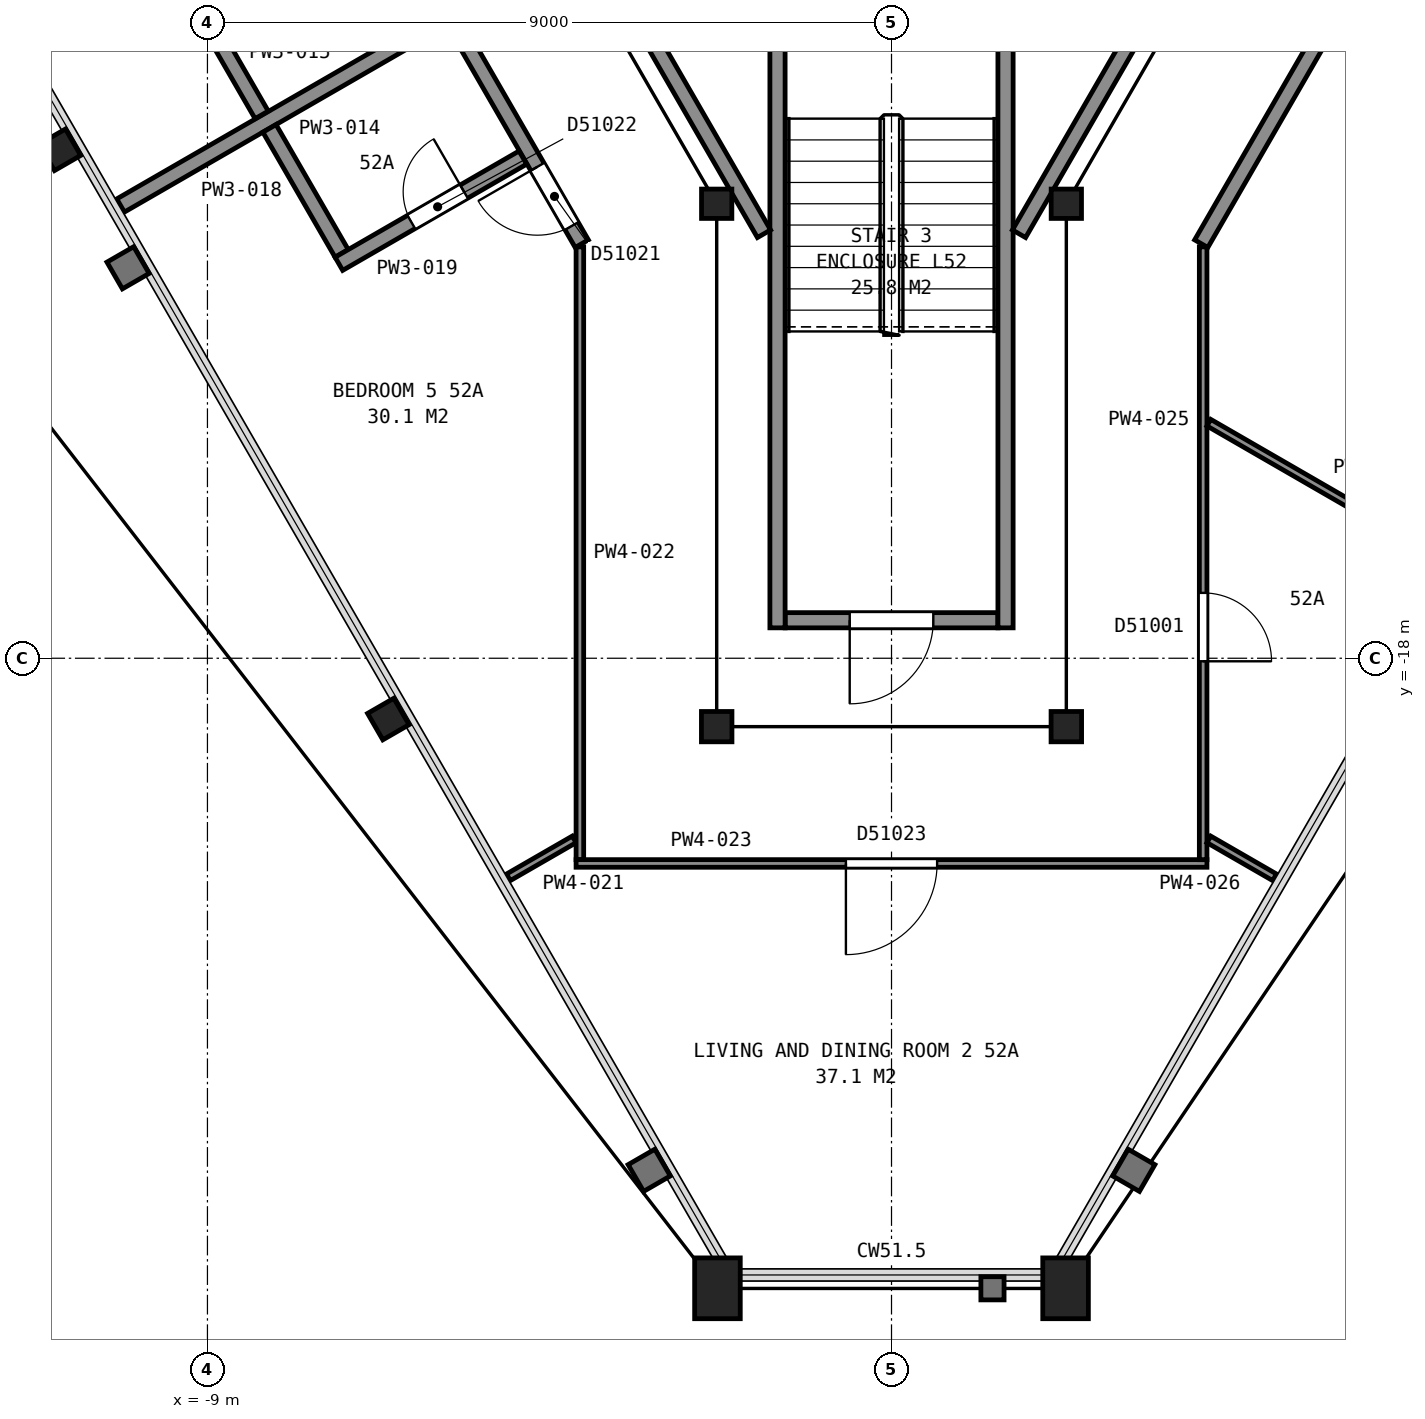
"""IFC4 building model, lengths in metres.
Left out: names, types, materials, properties, quantities, classifications, styles, units other than length and angle.
Written with IfcOpenShell. Run it as: python <this file> out.ifc"""

import sys

from ifc_helpers import new_model, si_unit, direction, frame, frame_2d, origin, origin_2d, place, context, subcontext, project, spatial, rectangle, hollow_rectangle, i_section, extrude, element, fill, save


model = new_model("IFC4")
c1 = context("Model", 3, precision=1e-05, world=origin(), true_north=direction((0.0, 1.0)))
c2 = subcontext(c1, "Body", "Model", "MODEL_VIEW")
j1 = project(units=[si_unit("LENGTHUNIT", "METRE"), si_unit("PLANEANGLEUNIT", "RADIAN")], contexts=[c1])
p1 = place(None, origin())
s1 = spatial("IfcSite", under=j1, at=p1, CompositionType="ELEMENT")
p2 = place(p1, origin())
s2 = spatial("IfcBuilding", under=s1, at=p2, CompositionType="ELEMENT")
p3 = place(p2, frame((0.0, 0.0, 210.1)))
s3 = spatial("IfcBuildingStorey", under=s2, at=p3, CompositionType="ELEMENT", Elevation=210.1)
for number, where, z_axis, x_axis in (
    (1, (-10.94, -11.31, 0.0), (0.0, 0.0, 1.0), (-0.5, 0.866, 0.0)),
    (2, (-6.62, -18.8, 0.0), (0.0, 0.0, 1.0), (-0.5, 0.866, 0.0)),
):
    element("IfcColumn", number, at=place(p3, frame(where, z_axis=z_axis, x_axis=x_axis)), inside=s3, PredefinedType="COLUMN", context=c2, shape_type="SweptSolid", body=[
        extrude(i_section(OverallWidth=0.401, OverallDepth=0.399, WebThickness=0.025, FlangeThickness=0.04, FilletRadius=0.015, at=origin_2d()), origin(), (0.0, 0.0, 1.0), 3.665),
    ])
for number, where, z_axis, x_axis in (
    (3, (-2.29, -26.29, 0.0), (0.0, 0.0, 1.0), (-1.0, 0.0, 0.0)),
    (4, (2.29, -26.29, 0.0), (0.0, 0.0, 1.0), (-1.0, 0.0, 0.0)),
):
    element("IfcColumn", number, at=place(p3, frame(where, z_axis=z_axis, x_axis=x_axis)), inside=s3, PredefinedType="COLUMN", context=c2, shape_type="SweptSolid", body=[
        extrude(hollow_rectangle(XDim=0.6, YDim=0.8, WallThickness=0.05, at=origin_2d()), origin(), (0.0, 0.0, 1.0), 3.635),
    ])
p4 = place(p3, frame((-2.3, -12.02, 0.0), z_axis=(0.0, 0.0, 1.0), x_axis=(1.0, 0.0, 0.0)))
e5 = element("IfcColumn", 5, at=p4, inside=s3, PredefinedType="COLUMN", context=c2, shape_type="SweptSolid", body=[
    extrude(i_section(OverallWidth=0.399, OverallDepth=0.386, WebThickness=0.021, FlangeThickness=0.033, FilletRadius=0.015, at=origin_2d()), origin(), (0.0, 0.0, 1.0), 3.7),
])
for number, where, z_axis, x_axis in (
    (6, (-2.3, -18.9, 0.0), (0.0, 0.0, 1.0), (-1.0, 0.0, 0.0)),
    (7, (2.3, -18.9, 0.0), (0.0, 0.0, 1.0), (-1.0, 0.0, 0.0)),
):
    element("IfcColumn", number, at=place(p3, frame(where, z_axis=z_axis, x_axis=x_axis)), inside=s3, PredefinedType="COLUMN", context=c2, shape_type="SweptSolid", body=[
        extrude(i_section(OverallWidth=0.401, OverallDepth=0.399, WebThickness=0.025, FlangeThickness=0.04, FilletRadius=0.015, at=origin_2d()), origin(), (0.0, 0.0, 1.0), 3.7),
    ])
p5 = place(p3, frame((2.3, -12.02, 0.0), z_axis=(0.0, 0.0, 1.0), x_axis=(1.0, 0.0, 0.0)))
e8 = element("IfcColumn", 8, at=p5, inside=s3, PredefinedType="COLUMN", context=c2, shape_type="SweptSolid", body=[
    extrude(i_section(OverallWidth=0.399, OverallDepth=0.386, WebThickness=0.021, FlangeThickness=0.033, FilletRadius=0.015, at=origin_2d()), origin(), (0.0, 0.0, 1.0), 3.7),
])
p6 = place(p3, frame((-1.4, -17.5, 0.0), z_axis=(0.0, 0.0, 1.0), x_axis=(1.0, 0.0, 0.0)))
e9 = element("IfcWall", 9, at=p6, inside=s3, PredefinedType="PARTITIONING", context=c2, shape_type="SweptSolid", body=[
    extrude(rectangle(XDim=2.8, YDim=0.2, at=frame_2d((1.4, 0.0))), origin(), (0.0, 0.0, 1.0), 3.45),
])
p7 = place(p6, frame((0.85, 0.0, 0.0)))
e10 = element("IfcOpeningElement", 10, at=p7, cuts=e9, PredefinedType="OPENING", context=c2, shape_type="SweptSolid", body=[
    extrude(rectangle(XDim=1.1, YDim=2.1, at=frame_2d((0.55, 1.05))), frame((0.0, 0.11, 0.0), z_axis=(0.0, -1.0, 0.0), x_axis=(1.0, 0.0, 0.0)), (0.0, 0.0, 1.0), 0.22),
])
for number, where, z_axis, x_axis in (
    (11, (1.5, -8.0, 0.0), (0.0, 0.0, 1.0), (0.0, -1.0, 0.0)),
    (12, (-1.5, -8.0, 0.0), (0.0, 0.0, 1.0), (0.0, -1.0, 0.0)),
):
    element("IfcWall", number, at=place(p3, frame(where, z_axis=z_axis, x_axis=x_axis)), inside=s3, PredefinedType="PARTITIONING", context=c2, shape_type="SweptSolid", body=[
        extrude(rectangle(XDim=9.6, YDim=0.2, at=frame_2d((4.8, 0.0))), origin(), (0.0, 0.0, 1.0), 3.45),
    ])
p8 = place(p3, frame((-4.655, -7.257, 0.0), z_axis=(0.0, 0.0, 1.0), x_axis=(0.499966124405, -0.866044960985, 0.0)))
e13 = element("IfcWall", 13, at=p8, inside=s3, PredefinedType="PARTITIONING", context=c2, shape_type="SweptSolid", body=[
    extrude(rectangle(XDim=5.956, YDim=0.2, at=frame_2d((2.978, 0.0))), origin(), (0.0, 0.0, 1.0), 3.45),
])
p9 = place(p8, frame((0.45, 0.0, 0.0)))
e14 = element("IfcOpeningElement", 14, at=p9, cuts=e13, PredefinedType="OPENING", context=c2, shape_type="SweptSolid", body=[
    extrude(rectangle(XDim=1.8, YDim=2.1, at=frame_2d((0.9, 1.05))), frame((0.0, 0.11, 0.0), z_axis=(0.0, -1.0, 0.0), x_axis=(1.0, 0.0, 0.0)), (0.0, 0.0, 1.0), 0.22),
])
p10 = place(p3, frame((1.677, -12.415, 0.0), z_axis=(0.0, 0.0, 1.0), x_axis=(0.500054337157, 0.865994029939, 0.0)))
e15 = element("IfcWall", 15, at=p10, inside=s3, PredefinedType="PARTITIONING", context=c2, shape_type="SweptSolid", body=[
    extrude(rectangle(XDim=6.177, YDim=0.2, at=frame_2d((3.088, 0.0))), origin(), (0.0, 0.0, 1.0), 3.45),
])
p11 = place(p3, frame((-4.075, -12.545, 0.0), z_axis=(0.0, 0.0, 1.0), x_axis=(-0.499999743747, 0.866025551732, 0.0)))
e16 = element("IfcWall", 16, at=p11, inside=s3, PredefinedType="PARTITIONING", context=c2, shape_type="SweptSolid", body=[
    extrude(rectangle(XDim=17.656, YDim=0.2, at=frame_2d((8.828, 0.0))), origin(), (0.0, 0.0, 1.0), 2.713),
])
p12 = place(p11, frame((9.895, 0.0, 0.0)))
e17 = element("IfcOpeningElement", 17, at=p12, cuts=e16, PredefinedType="OPENING", context=c2, shape_type="SweptSolid", body=[
    extrude(rectangle(XDim=0.9, YDim=2.1, at=frame_2d((0.45, 1.05))), frame((0.0, 0.11, 0.0), z_axis=(0.0, -1.0, 0.0), x_axis=(1.0, 0.0, 0.0)), (0.0, 0.0, 1.0), 0.22),
])
p13 = place(p11, frame((6.622, 0.0, 0.0)))
e18 = element("IfcOpeningElement", 18, at=p13, cuts=e16, PredefinedType="OPENING", context=c2, shape_type="SweptSolid", body=[
    extrude(rectangle(XDim=0.9, YDim=2.1, at=frame_2d((0.45, 1.05))), frame((0.0, 0.11, 0.0), z_axis=(0.0, -1.0, 0.0), x_axis=(1.0, 0.0, 0.0)), (0.0, 0.0, 1.0), 0.22),
])
p14 = place(p11, frame((0.268, 0.0, 0.0)))
e19 = element("IfcOpeningElement", 19, at=p14, cuts=e16, PredefinedType="OPENING", context=c2, shape_type="SweptSolid", body=[
    extrude(rectangle(XDim=0.9, YDim=2.1, at=frame_2d((0.45, 1.05))), frame((0.0, 0.11, 0.0), z_axis=(0.0, -1.0, 0.0), x_axis=(1.0, 0.0, 0.0)), (0.0, 0.0, 1.0), 0.22),
])
p15 = place(p3, frame((-10.143, -12.043, 0.0), z_axis=(0.0, 0.0, 1.0), x_axis=(0.866136679459, 0.49980721533, 0.0)))
e20 = element("IfcWall", 20, at=p15, inside=s3, PredefinedType="PARTITIONING", context=c2, shape_type="SweptSolid", body=[
    extrude(rectangle(XDim=4.904, YDim=0.2, at=frame_2d((2.452, 0.0))), origin(), (0.0, 0.0, 1.0), 2.713),
])
p16 = place(p3, frame((-9.234, -9.21, 0.0), z_axis=(0.0, 0.0, 1.0), x_axis=(0.499949193323, -0.866054735046, 0.0)))
e21 = element("IfcWall", 21, at=p16, inside=s3, PredefinedType="PARTITIONING", context=c2, shape_type="SweptSolid", body=[
    extrude(rectangle(XDim=1.895, YDim=0.2, at=frame_2d((0.948, 0.0))), origin(), (0.0, 0.0, 1.0), 2.713),
])
p17 = place(p3, frame((-8.184, -11.029, 0.0), z_axis=(0.0, 0.0, 1.0), x_axis=(0.500134112126, -0.865947960265, 0.0)))
e22 = element("IfcWall", 22, at=p17, inside=s3, PredefinedType="PARTITIONING", context=c2, shape_type="SweptSolid", body=[
    extrude(rectangle(XDim=1.899, YDim=0.2, at=frame_2d((0.95, 0.0))), origin(), (0.0, 0.0, 1.0), 2.713),
])
p18 = place(p3, frame((-7.271, -12.81, 0.0), z_axis=(0.0, 0.0, 1.0), x_axis=(0.866041588165, 0.499971966783, 0.0)))
e23 = element("IfcWall", 23, at=p18, inside=s3, PredefinedType="PARTITIONING", context=c2, shape_type="SweptSolid", body=[
    extrude(rectangle(XDim=2.795, YDim=0.2, at=frame_2d((1.397, 0.0))), origin(), (0.0, 0.0, 1.0), 2.713),
])
p19 = place(p18, frame((1.1, 0.0, 0.0)))
e24 = element("IfcOpeningElement", 24, at=p19, cuts=e23, PredefinedType="OPENING", context=c2, shape_type="SweptSolid", body=[
    extrude(rectangle(XDim=0.8, YDim=2.1, at=frame_2d((0.4, 1.05))), frame((0.0, 0.11, 0.0), z_axis=(0.0, -1.0, 0.0), x_axis=(1.0, 0.0, 0.0)), (0.0, 0.0, 1.0), 0.22),
])
p20 = place(p3, frame((-5.04, -20.882, 0.0), z_axis=(0.0, 0.0, 1.0), x_axis=(0.866234439787, 0.499637764112, 0.0)))
e25 = element("IfcWall", 25, at=p20, inside=s3, PredefinedType="PARTITIONING", context=c2, shape_type="SweptSolid", body=[
    extrude(rectangle(XDim=0.998, YDim=0.1, at=frame_2d((0.499, 0.0))), origin(), (0.0, 0.0, 1.0), 2.713),
])
p21 = place(p3, frame((-4.1, -20.65, 0.0), z_axis=(0.0, 0.0, 1.0), x_axis=(0.0, 1.0, 0.0)))
e26 = element("IfcWall", 26, at=p21, inside=s3, PredefinedType="PARTITIONING", context=c2, shape_type="SweptSolid", body=[
    extrude(rectangle(XDim=8.063, YDim=0.1, at=frame_2d((4.031, 0.0))), origin(), (0.0, 0.0, 1.0), 2.713),
])
p22 = place(p3, frame((4.15, -20.7, 0.0), z_axis=(0.0, 0.0, 1.0), x_axis=(-1.0, 0.0, 0.0)))
e27 = element("IfcWall", 27, at=p22, inside=s3, PredefinedType="PARTITIONING", context=c2, shape_type="SweptSolid", body=[
    extrude(rectangle(XDim=8.3, YDim=0.1, at=frame_2d((4.15, 0.0))), origin(), (0.0, 0.0, 1.0), 2.713),
])
p23 = place(p22, frame((3.55, 0.0, 0.0)))
e28 = element("IfcOpeningElement", 28, at=p23, cuts=e27, PredefinedType="OPENING", context=c2, shape_type="SweptSolid", body=[
    extrude(rectangle(XDim=1.2, YDim=2.1, at=frame_2d((0.6, 1.05))), frame((0.0, 0.06, 0.0), z_axis=(0.0, -1.0, 0.0), x_axis=(1.0, 0.0, 0.0)), (0.0, 0.0, 1.0), 0.12),
])
p24 = place(p3, frame((4.1, -12.587, 0.0), z_axis=(0.0, 0.0, 1.0), x_axis=(0.0, -1.0, 0.0)))
e29 = element("IfcWall", 29, at=p24, inside=s3, PredefinedType="PARTITIONING", context=c2, shape_type="SweptSolid", body=[
    extrude(rectangle(XDim=8.063, YDim=0.1, at=frame_2d((4.031, 0.0))), origin(), (0.0, 0.0, 1.0), 2.713),
])
p25 = place(p24, frame((4.553, 0.0, 0.0)))
e30 = element("IfcOpeningElement", 30, at=p25, cuts=e29, PredefinedType="OPENING", context=c2, shape_type="SweptSolid", body=[
    extrude(rectangle(XDim=0.9, YDim=2.1, at=frame_2d((0.45, 1.05))), frame((0.0, 0.06, 0.0), z_axis=(0.0, -1.0, 0.0), x_axis=(1.0, 0.0, 0.0)), (0.0, 0.0, 1.0), 0.12),
])
p26 = place(p3, frame((4.175, -20.383, 0.0), z_axis=(0.0, 0.0, 1.0), x_axis=(0.866234439787, -0.499637764112, 0.0)))
e31 = element("IfcWall", 31, at=p26, inside=s3, PredefinedType="PARTITIONING", context=c2, shape_type="SweptSolid", body=[
    extrude(rectangle(XDim=0.998, YDim=0.1, at=frame_2d((0.499, 0.0))), origin(), (0.0, 0.0, 1.0), 2.713),
])
p27 = place(p3, frame((4.175, -14.9, 0.0), z_axis=(0.0, 0.0, 1.0), x_axis=(0.866057308191, -0.499944735875, 0.0)))
e32 = element("IfcWall", 32, at=p27, inside=s3, PredefinedType="PARTITIONING", context=c2, shape_type="SweptSolid", body=[
    extrude(rectangle(XDim=3.74, YDim=0.1, at=frame_2d((1.87, 0.0))), origin(), (0.0, 0.0, 1.0), 2.713),
])
p28 = place(p3, frame((12.903, 2.745, 0.0), z_axis=(0.0, 0.0, 1.0), x_axis=(-0.499999743747, -0.866025551732, 0.0)))
e33 = element("IfcWall", 33, at=p28, inside=s3, PredefinedType="PARTITIONING", context=c2, shape_type="SweptSolid", body=[
    extrude(rectangle(XDim=17.656, YDim=0.2, at=frame_2d((8.828, 0.0))), origin(), (0.0, 0.0, 1.0), 2.713),
])
p29 = place(p28, frame((12.756, 0.0, 0.0)))
e34 = element("IfcOpeningElement", 34, at=p29, cuts=e33, PredefinedType="OPENING", context=c2, shape_type="SweptSolid", body=[
    extrude(rectangle(XDim=1.2, YDim=2.1, at=frame_2d((0.6, 1.05))), frame((0.0, 0.11, 0.0), z_axis=(0.0, -1.0, 0.0), x_axis=(1.0, 0.0, 0.0)), (0.0, 0.0, 1.0), 0.22),
])
p30 = place(p28, frame((7.044, 0.0, 0.0)))
e35 = element("IfcOpeningElement", 35, at=p30, cuts=e33, PredefinedType="OPENING", context=c2, shape_type="SweptSolid", body=[
    extrude(rectangle(XDim=0.9, YDim=2.1, at=frame_2d((0.45, 1.05))), frame((0.0, 0.11, 0.0), z_axis=(0.0, -1.0, 0.0), x_axis=(1.0, 0.0, 0.0)), (0.0, 0.0, 1.0), 0.22),
])
p31 = place(p28, frame((0.417, 0.0, 0.0)))
e36 = element("IfcOpeningElement", 36, at=p31, cuts=e33, PredefinedType="OPENING", context=c2, shape_type="SweptSolid", body=[
    extrude(rectangle(XDim=0.9, YDim=2.1, at=frame_2d((0.45, 1.05))), frame((0.0, 0.11, 0.0), z_axis=(0.0, -1.0, 0.0), x_axis=(1.0, 0.0, 0.0)), (0.0, 0.0, 1.0), 0.22),
])
p32 = place(p7, origin())
e37 = element("IfcDoor", 37, at=p32, inside=s3, OperationType="SINGLE_SWING_LEFT", PredefinedType="DOOR", context=c2, shape_type="SweptSolid", body=[
    extrude(rectangle(XDim=1.1, YDim=2.1, at=frame_2d((0.55, 1.05))), frame((0.0, 0.025, 0.0), z_axis=(0.0, -1.0, 0.0), x_axis=(1.0, 0.0, 0.0)), (0.0, 0.0, 1.0), 0.05),
])
fill(e10, e37)
p33 = place(p14, origin())
e38 = element("IfcDoor", 38, at=p33, inside=s3, OperationType="SINGLE_SWING_RIGHT", PredefinedType="DOOR", context=c2, shape_type="SweptSolid", body=[
    extrude(rectangle(XDim=0.9, YDim=2.1, at=frame_2d((0.45, 1.05))), frame((0.0, 0.025, 0.0), z_axis=(0.0, -1.0, 0.0), x_axis=(1.0, 0.0, 0.0)), (0.0, 0.0, 1.0), 0.05),
])
fill(e19, e38)
p34 = place(p19, origin())
e39 = element("IfcDoor", 39, at=p34, inside=s3, OperationType="SINGLE_SWING_RIGHT", PredefinedType="DOOR", context=c2, shape_type="SweptSolid", body=[
    extrude(rectangle(XDim=0.8, YDim=2.1, at=frame_2d((0.4, 1.05))), frame((0.0, 0.025, 0.0), z_axis=(0.0, -1.0, 0.0), x_axis=(1.0, 0.0, 0.0)), (0.0, 0.0, 1.0), 0.05),
])
fill(e24, e39)
p35 = place(p23, origin())
e40 = element("IfcDoor", 40, at=p35, inside=s3, OperationType="SINGLE_SWING_RIGHT", PredefinedType="DOOR", context=c2, shape_type="SweptSolid", body=[
    extrude(rectangle(XDim=1.2, YDim=2.1, at=frame_2d((0.6, 1.05))), frame((0.0, 0.025, 0.0), z_axis=(0.0, -1.0, 0.0), x_axis=(1.0, 0.0, 0.0)), (0.0, 0.0, 1.0), 0.05),
])
fill(e28, e40)
p36 = place(p25, origin())
e41 = element("IfcDoor", 41, at=p36, inside=s3, OperationType="SINGLE_SWING_RIGHT", PredefinedType="DOOR", context=c2, shape_type="SweptSolid", body=[
    extrude(rectangle(XDim=0.9, YDim=2.1, at=frame_2d((0.45, 1.05))), frame((0.0, 0.025, 0.0), z_axis=(0.0, -1.0, 0.0), x_axis=(1.0, 0.0, 0.0)), (0.0, 0.0, 1.0), 0.05),
])
fill(e30, e41)
save(model, sys.argv[1])
